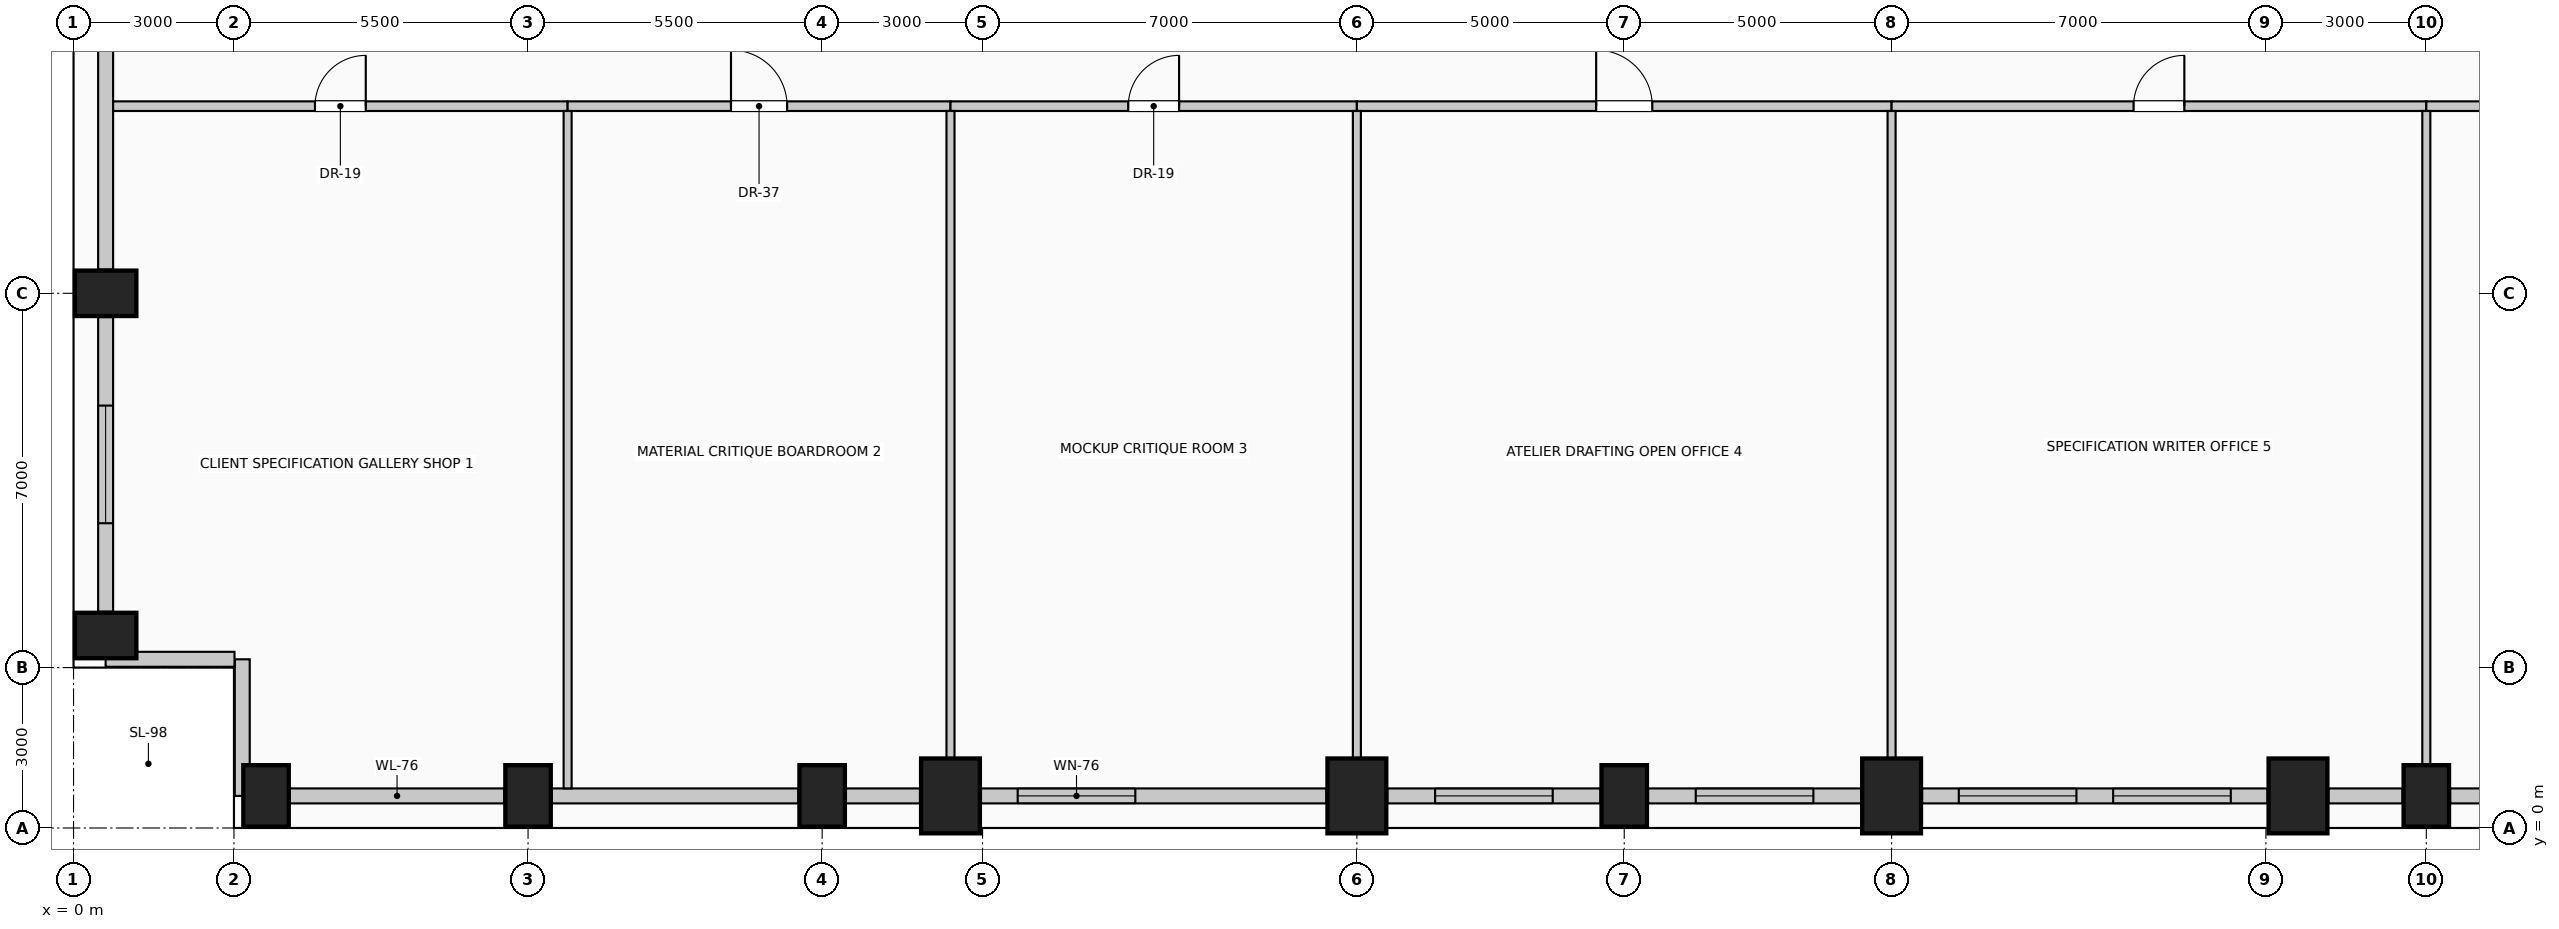
"""IFC4 building model, lengths in metres.
Left out: names, types, materials, properties, quantities, classifications, styles, units other than length and angle.
Written with IfcOpenShell. Run it as: python <this file> out.ifc"""

import sys

from ifc_helpers import new_model, si_unit, direction, frame, frame_2d, origin, origin_2d, place, context, subcontext, project, spatial, rectangle, extrude, element, fill, save


model = new_model("IFC4")
c1 = context("Model", 3, precision=1e-05, world=origin(), true_north=direction((0.0, 1.0)))
c2 = subcontext(c1, "Body", "Model", "MODEL_VIEW")
j1 = project(units=[si_unit("LENGTHUNIT", "METRE"), si_unit("PLANEANGLEUNIT", "RADIAN")], contexts=[c1])
p1 = place(None, origin())
s1 = spatial("IfcSite", under=j1, at=p1, CompositionType="ELEMENT")
p2 = place(p1, origin())
s2 = spatial("IfcBuilding", under=s1, at=p2, CompositionType="ELEMENT")
p3 = place(p2, frame((0.0, 0.0, 140.6)))
s3 = spatial("IfcBuildingStorey", under=s2, at=p3, CompositionType="ELEMENT", Elevation=140.6)
for number, where, z_axis, x_axis in (
    (1, (3.6, 0.6, 0.0), (0.0, 0.0, 1.0), (1.0, 0.0, 0.0)),
    (2, (8.5, 0.6, 0.0), (0.0, 0.0, 1.0), (1.0, 0.0, 0.0)),
    (3, (14.0, 0.6, 0.0), (0.0, 0.0, 1.0), (1.0, 0.0, 0.0)),
):
    element("IfcColumn", number, at=place(p3, frame(where, z_axis=z_axis, x_axis=x_axis)), inside=s3, PredefinedType="COLUMN", context=c2, shape_type="SweptSolid", body=[
        extrude(rectangle(XDim=0.85, YDim=1.15, at=origin_2d()), origin(), (0.0, 0.0, 1.0), 4.0),
    ])
for number, where, z_axis, x_axis in (
    (4, (16.4, 0.6, 0.0), (0.0, 0.0, 1.0), (1.0, 0.0, 0.0)),
    (5, (24.0, 0.6, 0.0), (0.0, 0.0, 1.0), (1.0, 0.0, 0.0)),
):
    element("IfcColumn", number, at=place(p3, frame(where, z_axis=z_axis, x_axis=x_axis)), inside=s3, PredefinedType="COLUMN", context=c2, shape_type="SweptSolid", body=[
        extrude(rectangle(XDim=1.1, YDim=1.4, at=origin_2d()), origin(), (0.0, 0.0, 1.0), 4.0),
    ])
p4 = place(p3, frame((29.0, 0.6, 0.0), z_axis=(0.0, 0.0, 1.0), x_axis=(1.0, 0.0, 0.0)))
e6 = element("IfcColumn", 6, at=p4, inside=s3, PredefinedType="COLUMN", context=c2, shape_type="SweptSolid", body=[
    extrude(rectangle(XDim=0.85, YDim=1.15, at=origin_2d()), origin(), (0.0, 0.0, 1.0), 4.0),
])
for number, where, z_axis, x_axis in (
    (7, (34.0, 0.6, 0.0), (0.0, 0.0, 1.0), (1.0, 0.0, 0.0)),
    (8, (41.6, 0.6, 0.0), (0.0, 0.0, 1.0), (1.0, 0.0, 0.0)),
):
    element("IfcColumn", number, at=place(p3, frame(where, z_axis=z_axis, x_axis=x_axis)), inside=s3, PredefinedType="COLUMN", context=c2, shape_type="SweptSolid", body=[
        extrude(rectangle(XDim=1.1, YDim=1.4, at=origin_2d()), origin(), (0.0, 0.0, 1.0), 4.0),
    ])
for number, where, z_axis, x_axis in (
    (9, (44.0, 0.6, 0.0), (0.0, 0.0, 1.0), (1.0, 0.0, 0.0)),
    (10, (0.6, 3.6, 0.0), (0.0, 0.0, 1.0), (0.0, 1.0, 0.0)),
    (11, (0.6, 10.0, 0.0), (0.0, 0.0, 1.0), (0.0, 1.0, 0.0)),
):
    element("IfcColumn", number, at=place(p3, frame(where, z_axis=z_axis, x_axis=x_axis)), inside=s3, PredefinedType="COLUMN", context=c2, shape_type="SweptSolid", body=[
        extrude(rectangle(XDim=0.85, YDim=1.15, at=origin_2d()), origin(), (0.0, 0.0, 1.0), 4.0),
    ])
p5 = place(p3, frame((8.055, 0.6, 0.0), z_axis=(0.0, 0.0, 1.0), x_axis=(-1.0, 0.0, 0.0)))
e12 = element("IfcWall", 12, at=p5, inside=s3, PredefinedType="SOLIDWALL", context=c2, shape_type="SweptSolid", body=[
    extrude(rectangle(XDim=4.01, YDim=0.28, at=frame_2d((2.005, 0.0))), origin(), (0.0, 0.0, 1.0), 2.875),
])
p6 = place(p3, frame((13.555, 0.6, 0.0), z_axis=(0.0, 0.0, 1.0), x_axis=(-1.0, 0.0, 0.0)))
e13 = element("IfcWall", 13, at=p6, inside=s3, PredefinedType="SOLIDWALL", context=c2, shape_type="SweptSolid", body=[
    extrude(rectangle(XDim=4.61, YDim=0.28, at=frame_2d((2.305, 0.0))), origin(), (0.0, 0.0, 1.0), 2.875),
])
p7 = place(p3, frame((15.83, 0.6, 0.0), z_axis=(0.0, 0.0, 1.0), x_axis=(-1.0, 0.0, 0.0)))
e14 = element("IfcWall", 14, at=p7, inside=s3, PredefinedType="SOLIDWALL", context=c2, shape_type="SweptSolid", body=[
    extrude(rectangle(XDim=1.385, YDim=0.28, at=frame_2d((0.692, 0.0))), origin(), (0.0, 0.0, 1.0), 2.875),
])
p8 = place(p3, frame((23.43, 0.6, 0.0), z_axis=(0.0, 0.0, 1.0), x_axis=(-1.0, 0.0, 0.0)))
e15 = element("IfcWall", 15, at=p8, inside=s3, PredefinedType="SOLIDWALL", context=c2, shape_type="SweptSolid", body=[
    extrude(rectangle(XDim=6.46, YDim=0.28, at=frame_2d((3.23, 0.0))), origin(), (0.0, 0.0, 1.0), 2.875),
])
p9 = place(p8, frame((3.573, 0.0, 0.5)))
e16 = element("IfcOpeningElement", 16, at=p9, cuts=e15, PredefinedType="OPENING", context=c2, shape_type="SweptSolid", body=[
    extrude(rectangle(XDim=2.2, YDim=1.95, at=frame_2d((1.1, 0.975))), frame((0.0, 0.15, 0.0), z_axis=(0.0, -1.0, 0.0), x_axis=(1.0, 0.0, 0.0)), (0.0, 0.0, 1.0), 0.3),
])
p10 = place(p3, frame((28.555, 0.6, 0.0), z_axis=(0.0, 0.0, 1.0), x_axis=(-1.0, 0.0, 0.0)))
e17 = element("IfcWall", 17, at=p10, inside=s3, PredefinedType="SOLIDWALL", context=c2, shape_type="SweptSolid", body=[
    extrude(rectangle(XDim=3.985, YDim=0.28, at=frame_2d((1.992, 0.0))), origin(), (0.0, 0.0, 1.0), 2.875),
])
p11 = place(p10, frame((0.893, 0.0, 0.5)))
e18 = element("IfcOpeningElement", 18, at=p11, cuts=e17, PredefinedType="OPENING", context=c2, shape_type="SweptSolid", body=[
    extrude(rectangle(XDim=2.2, YDim=1.95, at=frame_2d((1.1, 0.975))), frame((0.0, 0.15, 0.0), z_axis=(0.0, -1.0, 0.0), x_axis=(1.0, 0.0, 0.0)), (0.0, 0.0, 1.0), 0.3),
])
p12 = place(p3, frame((33.43, 0.6, 0.0), z_axis=(0.0, 0.0, 1.0), x_axis=(-1.0, 0.0, 0.0)))
e19 = element("IfcWall", 19, at=p12, inside=s3, PredefinedType="SOLIDWALL", context=c2, shape_type="SweptSolid", body=[
    extrude(rectangle(XDim=3.985, YDim=0.28, at=frame_2d((1.992, 0.0))), origin(), (0.0, 0.0, 1.0), 2.875),
])
p13 = place(p12, frame((0.893, 0.0, 0.5)))
e20 = element("IfcOpeningElement", 20, at=p13, cuts=e19, PredefinedType="OPENING", context=c2, shape_type="SweptSolid", body=[
    extrude(rectangle(XDim=2.2, YDim=1.95, at=frame_2d((1.1, 0.975))), frame((0.0, 0.15, 0.0), z_axis=(0.0, -1.0, 0.0), x_axis=(1.0, 0.0, 0.0)), (0.0, 0.0, 1.0), 0.3),
])
p14 = place(p3, frame((41.03, 0.6, 0.0), z_axis=(0.0, 0.0, 1.0), x_axis=(-1.0, 0.0, 0.0)))
e21 = element("IfcWall", 21, at=p14, inside=s3, PredefinedType="SOLIDWALL", context=c2, shape_type="SweptSolid", body=[
    extrude(rectangle(XDim=6.46, YDim=0.28, at=frame_2d((3.23, 0.0))), origin(), (0.0, 0.0, 1.0), 2.875),
])
p15 = place(p14, frame((0.687, 0.0, 0.5)))
e22 = element("IfcOpeningElement", 22, at=p15, cuts=e21, PredefinedType="OPENING", context=c2, shape_type="SweptSolid", body=[
    extrude(rectangle(XDim=2.2, YDim=1.95, at=frame_2d((1.1, 0.975))), frame((0.0, 0.15, 0.0), z_axis=(0.0, -1.0, 0.0), x_axis=(1.0, 0.0, 0.0)), (0.0, 0.0, 1.0), 0.3),
])
p16 = place(p14, frame((3.573, 0.0, 0.5)))
e23 = element("IfcOpeningElement", 23, at=p16, cuts=e21, PredefinedType="OPENING", context=c2, shape_type="SweptSolid", body=[
    extrude(rectangle(XDim=2.2, YDim=1.95, at=frame_2d((1.1, 0.975))), frame((0.0, 0.15, 0.0), z_axis=(0.0, -1.0, 0.0), x_axis=(1.0, 0.0, 0.0)), (0.0, 0.0, 1.0), 0.3),
])
p17 = place(p3, frame((43.555, 0.6, 0.0), z_axis=(0.0, 0.0, 1.0), x_axis=(-1.0, 0.0, 0.0)))
e24 = element("IfcWall", 24, at=p17, inside=s3, PredefinedType="SOLIDWALL", context=c2, shape_type="SweptSolid", body=[
    extrude(rectangle(XDim=1.385, YDim=0.28, at=frame_2d((0.692, 0.0))), origin(), (0.0, 0.0, 1.0), 2.875),
])
p18 = place(p3, frame((49.055, 0.6, 0.0), z_axis=(0.0, 0.0, 1.0), x_axis=(-1.0, 0.0, 0.0)))
e25 = element("IfcWall", 25, at=p18, inside=s3, PredefinedType="SOLIDWALL", context=c2, shape_type="SweptSolid", body=[
    extrude(rectangle(XDim=4.61, YDim=0.28, at=frame_2d((2.305, 0.0))), origin(), (0.0, 0.0, 1.0), 2.875),
])
p19 = place(p3, frame((0.6, 4.045, 0.0), z_axis=(0.0, 0.0, 1.0), x_axis=(0.0, 1.0, 0.0)))
e26 = element("IfcWall", 26, at=p19, inside=s3, PredefinedType="SOLIDWALL", context=c2, shape_type="SweptSolid", body=[
    extrude(rectangle(XDim=5.51, YDim=0.28, at=frame_2d((2.755, 0.0))), origin(), (0.0, 0.0, 1.0), 2.875),
])
p20 = place(p19, frame((1.655, 0.0, 0.5)))
e27 = element("IfcOpeningElement", 27, at=p20, cuts=e26, PredefinedType="OPENING", context=c2, shape_type="SweptSolid", body=[
    extrude(rectangle(XDim=2.2, YDim=1.95, at=frame_2d((1.1, 0.975))), frame((0.0, 0.15, 0.0), z_axis=(0.0, -1.0, 0.0), x_axis=(1.0, 0.0, 0.0)), (0.0, 0.0, 1.0), 0.3),
])
p21 = place(p3, frame((0.6, 10.445, 0.0), z_axis=(0.0, 0.0, 1.0), x_axis=(0.0, 1.0, 0.0)))
e28 = element("IfcWall", 28, at=p21, inside=s3, PredefinedType="SOLIDWALL", context=c2, shape_type="SweptSolid", body=[
    extrude(rectangle(XDim=7.11, YDim=0.28, at=frame_2d((3.555, 0.0))), origin(), (0.0, 0.0, 1.0), 2.875),
])
p22 = place(p3, frame((3.155, 0.6, 0.0), z_axis=(0.0, 0.0, 1.0), x_axis=(0.0, 1.0, 0.0)))
e29 = element("IfcWall", 29, at=p22, inside=s3, PredefinedType="SOLIDWALL", context=c2, shape_type="SweptSolid", body=[
    extrude(rectangle(XDim=2.555, YDim=0.28, at=frame_2d((1.277, 0.0))), origin(), (0.0, 0.0, 1.0), 3.725),
])
p23 = place(p3, frame((3.01, 3.155, 0.0), z_axis=(0.0, 0.0, 1.0), x_axis=(-1.0, 0.0, 0.0)))
e30 = element("IfcWall", 30, at=p23, inside=s3, PredefinedType="SOLIDWALL", context=c2, shape_type="SweptSolid", body=[
    extrude(rectangle(XDim=2.41, YDim=0.28, at=frame_2d((1.205, 0.0))), origin(), (0.0, 0.0, 1.0), 3.725),
])
p24 = place(p3, frame((0.74, 13.5, 0.0), z_axis=(0.0, 0.0, 1.0), x_axis=(1.0, 0.0, 0.0)))
e31 = element("IfcWall", 31, at=p24, inside=s3, PredefinedType="PARTITIONING", context=c2, shape_type="SweptSolid", body=[
    extrude(rectangle(XDim=8.5, YDim=0.18, at=frame_2d((4.25, 0.0))), origin(), (0.0, 0.0, 1.0), 3.725),
])
p25 = place(p24, frame((3.775, 0.0, 0.0)))
e32 = element("IfcOpeningElement", 32, at=p25, cuts=e31, PredefinedType="OPENING", context=c2, shape_type="SweptSolid", body=[
    extrude(rectangle(XDim=0.95, YDim=2.15, at=frame_2d((0.475, 1.075))), frame((0.0, 0.1, 0.0), z_axis=(0.0, -1.0, 0.0), x_axis=(1.0, 0.0, 0.0)), (0.0, 0.0, 1.0), 0.2),
])
p26 = place(p3, frame((9.24, 13.5, 0.0), z_axis=(0.0, 0.0, 1.0), x_axis=(1.0, 0.0, 0.0)))
e33 = element("IfcWall", 33, at=p26, inside=s3, PredefinedType="PARTITIONING", context=c2, shape_type="SweptSolid", body=[
    extrude(rectangle(XDim=7.16, YDim=0.18, at=frame_2d((3.58, 0.0))), origin(), (0.0, 0.0, 1.0), 3.725),
])
p27 = place(p26, frame((3.055, 0.0, 0.0)))
e34 = element("IfcOpeningElement", 34, at=p27, cuts=e33, PredefinedType="OPENING", context=c2, shape_type="SweptSolid", body=[
    extrude(rectangle(XDim=1.05, YDim=2.15, at=frame_2d((0.525, 1.075))), frame((0.0, 0.1, 0.0), z_axis=(0.0, -1.0, 0.0), x_axis=(1.0, 0.0, 0.0)), (0.0, 0.0, 1.0), 0.2),
])
p28 = place(p3, frame((16.4, 13.5, 0.0), z_axis=(0.0, 0.0, 1.0), x_axis=(1.0, 0.0, 0.0)))
e35 = element("IfcWall", 35, at=p28, inside=s3, PredefinedType="PARTITIONING", context=c2, shape_type="SweptSolid", body=[
    extrude(rectangle(XDim=7.6, YDim=0.18, at=frame_2d((3.8, 0.0))), origin(), (0.0, 0.0, 1.0), 3.725),
])
p29 = place(p28, frame((3.325, 0.0, 0.0)))
e36 = element("IfcOpeningElement", 36, at=p29, cuts=e35, PredefinedType="OPENING", context=c2, shape_type="SweptSolid", body=[
    extrude(rectangle(XDim=0.95, YDim=2.15, at=frame_2d((0.475, 1.075))), frame((0.0, 0.1, 0.0), z_axis=(0.0, -1.0, 0.0), x_axis=(1.0, 0.0, 0.0)), (0.0, 0.0, 1.0), 0.2),
])
p30 = place(p3, frame((24.0, 13.5, 0.0), z_axis=(0.0, 0.0, 1.0), x_axis=(1.0, 0.0, 0.0)))
e37 = element("IfcWall", 37, at=p30, inside=s3, PredefinedType="PARTITIONING", context=c2, shape_type="SweptSolid", body=[
    extrude(rectangle(XDim=10.0, YDim=0.18, at=frame_2d((5.0, 0.0))), origin(), (0.0, 0.0, 1.0), 3.725),
])
p31 = place(p30, frame((4.475, 0.0, 0.0)))
e38 = element("IfcOpeningElement", 38, at=p31, cuts=e37, PredefinedType="OPENING", context=c2, shape_type="SweptSolid", body=[
    extrude(rectangle(XDim=1.05, YDim=2.15, at=frame_2d((0.525, 1.075))), frame((0.0, 0.1, 0.0), z_axis=(0.0, -1.0, 0.0), x_axis=(1.0, 0.0, 0.0)), (0.0, 0.0, 1.0), 0.2),
])
p32 = place(p3, frame((34.0, 13.5, 0.0), z_axis=(0.0, 0.0, 1.0), x_axis=(1.0, 0.0, 0.0)))
e39 = element("IfcWall", 39, at=p32, inside=s3, PredefinedType="PARTITIONING", context=c2, shape_type="SweptSolid", body=[
    extrude(rectangle(XDim=10.0, YDim=0.18, at=frame_2d((5.0, 0.0))), origin(), (0.0, 0.0, 1.0), 3.725),
])
p33 = place(p32, frame((4.525, 0.0, 0.0)))
e40 = element("IfcOpeningElement", 40, at=p33, cuts=e39, PredefinedType="OPENING", context=c2, shape_type="SweptSolid", body=[
    extrude(rectangle(XDim=0.95, YDim=2.15, at=frame_2d((0.475, 1.075))), frame((0.0, 0.1, 0.0), z_axis=(0.0, -1.0, 0.0), x_axis=(1.0, 0.0, 0.0)), (0.0, 0.0, 1.0), 0.2),
])
p34 = place(p3, frame((44.0, 13.5, 0.0), z_axis=(0.0, 0.0, 1.0), x_axis=(1.0, 0.0, 0.0)))
e41 = element("IfcWall", 41, at=p34, inside=s3, PredefinedType="PARTITIONING", context=c2, shape_type="SweptSolid", body=[
    extrude(rectangle(XDim=13.26, YDim=0.18, at=frame_2d((6.63, 0.0))), origin(), (0.0, 0.0, 1.0), 3.725),
])
p35 = place(p34, frame((6.105, 0.0, 0.0)))
e42 = element("IfcOpeningElement", 42, at=p35, cuts=e41, PredefinedType="OPENING", context=c2, shape_type="SweptSolid", body=[
    extrude(rectangle(XDim=1.05, YDim=2.15, at=frame_2d((0.525, 1.075))), frame((0.0, 0.1, 0.0), z_axis=(0.0, -1.0, 0.0), x_axis=(1.0, 0.0, 0.0)), (0.0, 0.0, 1.0), 0.2),
])
p36 = place(p3, frame((9.24, 0.74, 0.0), z_axis=(0.0, 0.0, 1.0), x_axis=(0.0, 1.0, 0.0)))
e43 = element("IfcWall", 43, at=p36, inside=s3, PredefinedType="PARTITIONING", context=c2, shape_type="SweptSolid", body=[
    extrude(rectangle(XDim=12.67, YDim=0.15, at=frame_2d((6.335, 0.0))), origin(), (0.0, 0.0, 1.0), 3.725),
])
p37 = place(p3, frame((16.4, 1.3, 0.0), z_axis=(0.0, 0.0, 1.0), x_axis=(0.0, 1.0, 0.0)))
e44 = element("IfcWall", 44, at=p37, inside=s3, PredefinedType="PARTITIONING", context=c2, shape_type="SweptSolid", body=[
    extrude(rectangle(XDim=12.11, YDim=0.15, at=frame_2d((6.055, 0.0))), origin(), (0.0, 0.0, 1.0), 3.07),
])
for number, where, z_axis, x_axis in (
    (45, (24.0, 1.3, 0.0), (0.0, 0.0, 1.0), (0.0, 1.0, 0.0)),
    (46, (34.0, 1.3, 0.0), (0.0, 0.0, 1.0), (0.0, 1.0, 0.0)),
):
    element("IfcWall", number, at=place(p3, frame(where, z_axis=z_axis, x_axis=x_axis)), inside=s3, PredefinedType="PARTITIONING", context=c2, shape_type="SweptSolid", body=[
        extrude(rectangle(XDim=12.11, YDim=0.15, at=frame_2d((6.055, 0.0))), origin(), (0.0, 0.0, 1.0), 3.725),
    ])
p38 = place(p3, frame((44.0, 1.175, 0.0), z_axis=(0.0, 0.0, 1.0), x_axis=(0.0, 1.0, 0.0)))
e47 = element("IfcWall", 47, at=p38, inside=s3, PredefinedType="PARTITIONING", context=c2, shape_type="SweptSolid", body=[
    extrude(rectangle(XDim=12.235, YDim=0.15, at=frame_2d((6.117, 0.0))), origin(), (0.0, 0.0, 1.0), 3.725),
])
p39 = place(p9, origin())
e48 = element("IfcWindow", 48, at=p39, inside=s3, PartitioningType="SINGLE_PANEL", PredefinedType="WINDOW", context=c2, shape_type="SweptSolid", body=[
    extrude(rectangle(XDim=2.2, YDim=1.95, at=frame_2d((1.1, 0.975))), frame((0.0, 0.03, 0.0), z_axis=(0.0, -1.0, 0.0), x_axis=(1.0, 0.0, 0.0)), (0.0, 0.0, 1.0), 0.06),
])
fill(e16, e48)
p40 = place(p11, origin())
e49 = element("IfcWindow", 49, at=p40, inside=s3, PartitioningType="SINGLE_PANEL", PredefinedType="WINDOW", context=c2, shape_type="SweptSolid", body=[
    extrude(rectangle(XDim=2.2, YDim=1.95, at=frame_2d((1.1, 0.975))), frame((0.0, 0.03, 0.0), z_axis=(0.0, -1.0, 0.0), x_axis=(1.0, 0.0, 0.0)), (0.0, 0.0, 1.0), 0.06),
])
fill(e18, e49)
p41 = place(p13, origin())
e50 = element("IfcWindow", 50, at=p41, inside=s3, PartitioningType="SINGLE_PANEL", PredefinedType="WINDOW", context=c2, shape_type="SweptSolid", body=[
    extrude(rectangle(XDim=2.2, YDim=1.95, at=frame_2d((1.1, 0.975))), frame((0.0, 0.03, 0.0), z_axis=(0.0, -1.0, 0.0), x_axis=(1.0, 0.0, 0.0)), (0.0, 0.0, 1.0), 0.06),
])
fill(e20, e50)
p42 = place(p15, origin())
e51 = element("IfcWindow", 51, at=p42, inside=s3, PartitioningType="SINGLE_PANEL", PredefinedType="WINDOW", context=c2, shape_type="SweptSolid", body=[
    extrude(rectangle(XDim=2.2, YDim=1.95, at=frame_2d((1.1, 0.975))), frame((0.0, 0.03, 0.0), z_axis=(0.0, -1.0, 0.0), x_axis=(1.0, 0.0, 0.0)), (0.0, 0.0, 1.0), 0.06),
])
fill(e22, e51)
p43 = place(p16, origin())
e52 = element("IfcWindow", 52, at=p43, inside=s3, PartitioningType="SINGLE_PANEL", PredefinedType="WINDOW", context=c2, shape_type="SweptSolid", body=[
    extrude(rectangle(XDim=2.2, YDim=1.95, at=frame_2d((1.1, 0.975))), frame((0.0, 0.03, 0.0), z_axis=(0.0, -1.0, 0.0), x_axis=(1.0, 0.0, 0.0)), (0.0, 0.0, 1.0), 0.06),
])
fill(e23, e52)
p44 = place(p20, origin())
e53 = element("IfcWindow", 53, at=p44, inside=s3, PartitioningType="SINGLE_PANEL", PredefinedType="WINDOW", context=c2, shape_type="SweptSolid", body=[
    extrude(rectangle(XDim=2.2, YDim=1.95, at=frame_2d((1.1, 0.975))), frame((0.0, 0.03, 0.0), z_axis=(0.0, -1.0, 0.0), x_axis=(1.0, 0.0, 0.0)), (0.0, 0.0, 1.0), 0.06),
])
fill(e27, e53)
p45 = place(p25, origin())
e54 = element("IfcDoor", 54, at=p45, inside=s3, OperationType="SINGLE_SWING_RIGHT", PredefinedType="DOOR", context=c2, shape_type="SweptSolid", body=[
    extrude(rectangle(XDim=0.95, YDim=2.15, at=frame_2d((0.475, 1.075))), frame((0.0, 0.025, 0.0), z_axis=(0.0, -1.0, 0.0), x_axis=(1.0, 0.0, 0.0)), (0.0, 0.0, 1.0), 0.05),
])
fill(e32, e54)
p46 = place(p27, origin())
e55 = element("IfcDoor", 55, at=p46, inside=s3, OperationType="SINGLE_SWING_LEFT", PredefinedType="DOOR", context=c2, shape_type="SweptSolid", body=[
    extrude(rectangle(XDim=1.05, YDim=2.15, at=frame_2d((0.525, 1.075))), frame((0.0, 0.025, 0.0), z_axis=(0.0, -1.0, 0.0), x_axis=(1.0, 0.0, 0.0)), (0.0, 0.0, 1.0), 0.05),
])
fill(e34, e55)
p47 = place(p29, origin())
e56 = element("IfcDoor", 56, at=p47, inside=s3, OperationType="SINGLE_SWING_RIGHT", PredefinedType="DOOR", context=c2, shape_type="SweptSolid", body=[
    extrude(rectangle(XDim=0.95, YDim=2.15, at=frame_2d((0.475, 1.075))), frame((0.0, 0.025, 0.0), z_axis=(0.0, -1.0, 0.0), x_axis=(1.0, 0.0, 0.0)), (0.0, 0.0, 1.0), 0.05),
])
fill(e36, e56)
p48 = place(p31, origin())
e57 = element("IfcDoor", 57, at=p48, inside=s3, OperationType="SINGLE_SWING_LEFT", PredefinedType="DOOR", context=c2, shape_type="SweptSolid", body=[
    extrude(rectangle(XDim=1.05, YDim=2.15, at=frame_2d((0.525, 1.075))), frame((0.0, 0.025, 0.0), z_axis=(0.0, -1.0, 0.0), x_axis=(1.0, 0.0, 0.0)), (0.0, 0.0, 1.0), 0.05),
])
fill(e38, e57)
p49 = place(p33, origin())
e58 = element("IfcDoor", 58, at=p49, inside=s3, OperationType="SINGLE_SWING_RIGHT", PredefinedType="DOOR", context=c2, shape_type="SweptSolid", body=[
    extrude(rectangle(XDim=0.95, YDim=2.15, at=frame_2d((0.475, 1.075))), frame((0.0, 0.025, 0.0), z_axis=(0.0, -1.0, 0.0), x_axis=(1.0, 0.0, 0.0)), (0.0, 0.0, 1.0), 0.05),
])
fill(e40, e58)
save(model, sys.argv[1])
